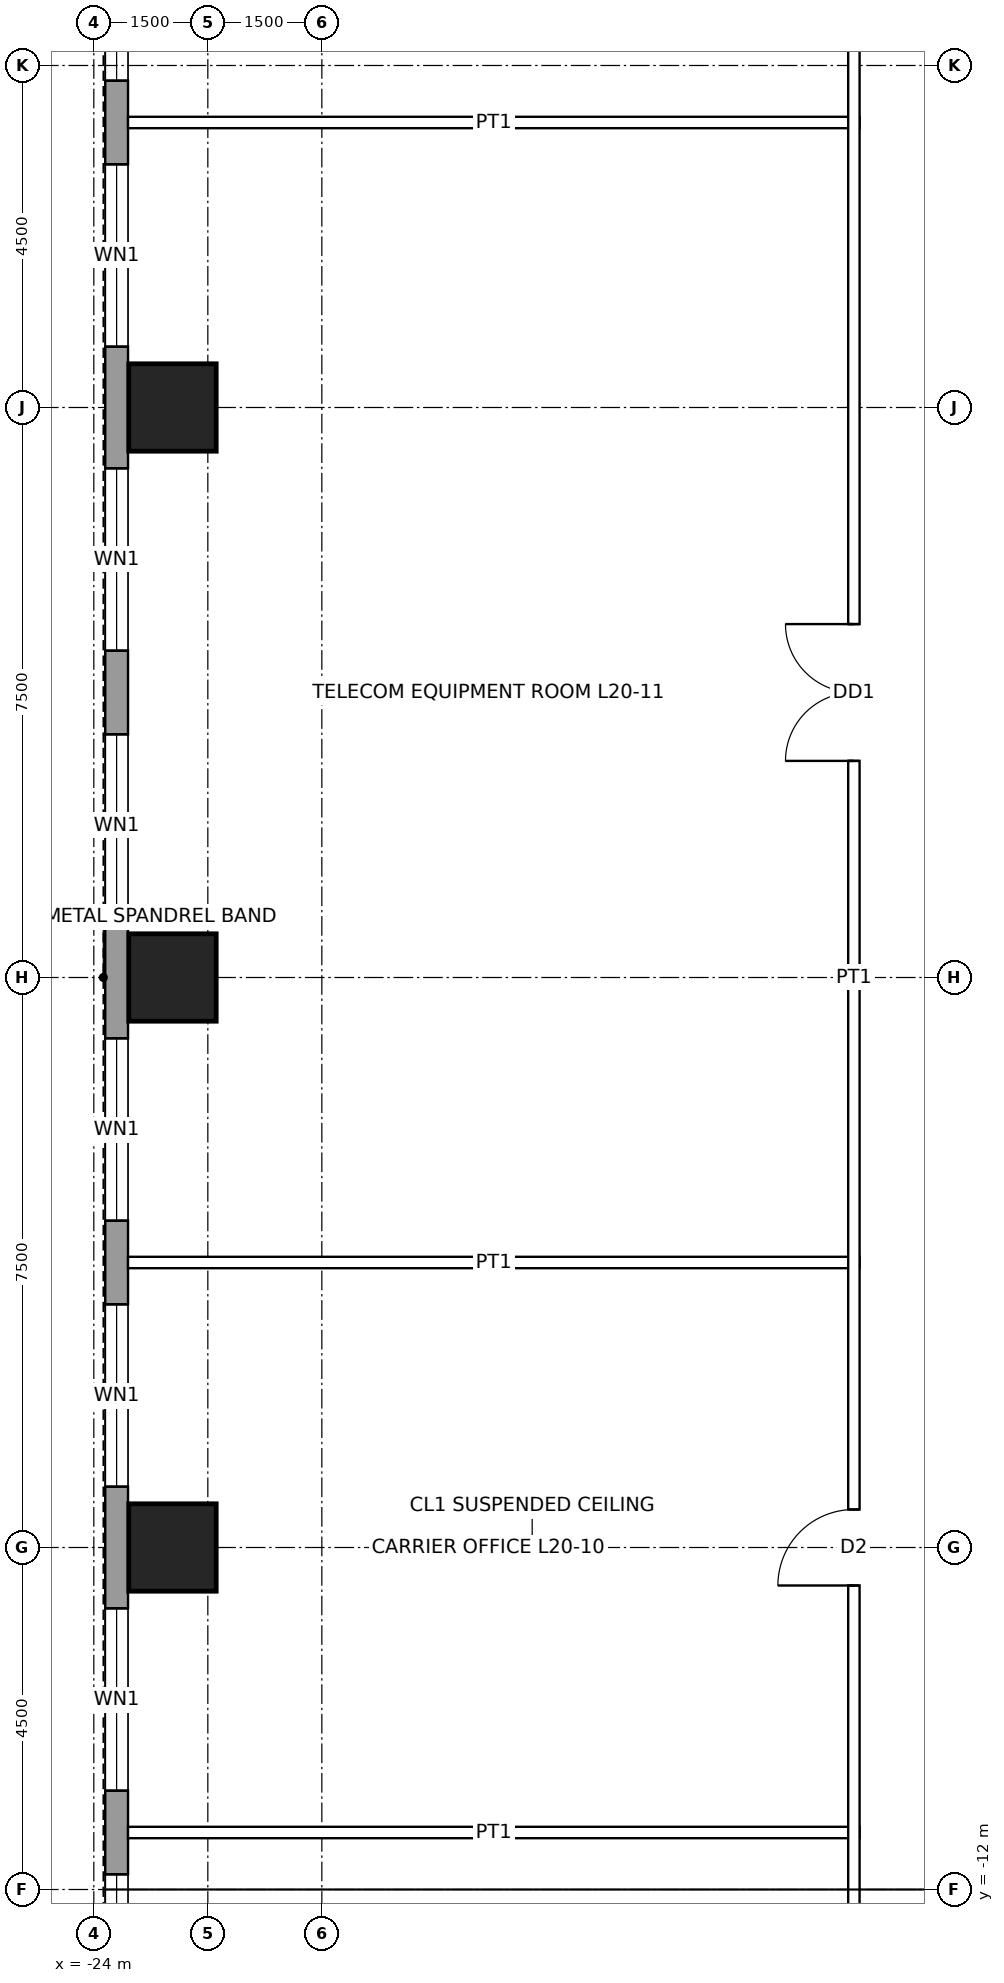
"""IFC4 building model, lengths in metres.
Left out: names, types, materials, properties, quantities, classifications, styles, units other than length and angle.
Written with IfcOpenShell. Run it as: python <this file> out.ifc"""

import sys

from ifc_helpers import new_model, si_unit, direction, frame, frame_2d, origin, origin_2d, place, context, subcontext, project, spatial, rectangle, hollow_rectangle, extrude, element, fill, save


model = new_model("IFC4")
c1 = context("Model", 3, precision=1e-05, world=origin(), true_north=direction((0.0, 1.0)))
c2 = subcontext(c1, "Body", "Model", "MODEL_VIEW")
j1 = project(units=[si_unit("LENGTHUNIT", "METRE"), si_unit("PLANEANGLEUNIT", "RADIAN")], contexts=[c1])
p1 = place(None, origin())
s1 = spatial("IfcSite", under=j1, at=p1, CompositionType="ELEMENT")
p2 = place(p1, origin())
s2 = spatial("IfcBuilding", under=s1, at=p2, CompositionType="ELEMENT")
p3 = place(p2, frame((0.0, 0.0, 104.4)))
s3 = spatial("IfcBuildingStorey", under=s2, at=p3, CompositionType="ELEMENT", Elevation=104.4)
for number, where, z_axis, x_axis in (
    (1, (-22.965, -7.5, 0.0), (0.0, 0.0, 1.0), (1.0, 0.0, 0.0)),
    (2, (-22.965, 0.0, 0.0), (0.0, 0.0, 1.0), (1.0, 0.0, 0.0)),
    (3, (-22.965, 7.5, 0.0), (0.0, 0.0, 1.0), (1.0, 0.0, 0.0)),
):
    element("IfcColumn", number, at=place(p3, frame(where, z_axis=z_axis, x_axis=x_axis)), inside=s3, PredefinedType="COLUMN", context=c2, shape_type="SweptSolid", body=[
        extrude(hollow_rectangle(XDim=1.15, YDim=1.15, WallThickness=0.075, at=origin_2d()), origin(), (0.0, 0.0, 1.0), 4.5),
    ])
p4 = place(p3, frame((-23.7, -16.2, 0.0), z_axis=(0.0, 0.0, 1.0), x_axis=(0.0, 1.0, 0.0)))
e4 = element("IfcWall", 4, at=p4, inside=s3, PredefinedType="SOLIDWALL", context=c2, shape_type="SweptSolid", body=[
    extrude(rectangle(XDim=32.4, YDim=0.3, at=frame_2d((16.2, 0.0))), origin(), (0.0, 0.0, 1.0), 4.3),
])
p5 = place(p4, frame((2.0, 0.0, 1.0)))
e5 = element("IfcOpeningElement", 5, at=p5, cuts=e4, PredefinedType="OPENING", context=c2, shape_type="SweptSolid", body=[
    extrude(rectangle(XDim=2.4, YDim=1.2, at=frame_2d((1.2, 0.6))), frame((0.0, 0.16, 0.0), z_axis=(0.0, -1.0, 0.0), x_axis=(1.0, 0.0, 0.0)), (0.0, 0.0, 1.0), 0.32),
])
p6 = place(p4, frame((5.5, 0.0, 1.0)))
e6 = element("IfcOpeningElement", 6, at=p6, cuts=e4, PredefinedType="OPENING", context=c2, shape_type="SweptSolid", body=[
    extrude(rectangle(XDim=2.4, YDim=1.2, at=frame_2d((1.2, 0.6))), frame((0.0, 0.16, 0.0), z_axis=(0.0, -1.0, 0.0), x_axis=(1.0, 0.0, 0.0)), (0.0, 0.0, 1.0), 0.32),
])
p7 = place(p4, frame((9.5, 0.0, 1.0)))
e7 = element("IfcOpeningElement", 7, at=p7, cuts=e4, PredefinedType="OPENING", context=c2, shape_type="SweptSolid", body=[
    extrude(rectangle(XDim=2.4, YDim=1.2, at=frame_2d((1.2, 0.6))), frame((0.0, 0.16, 0.0), z_axis=(0.0, -1.0, 0.0), x_axis=(1.0, 0.0, 0.0)), (0.0, 0.0, 1.0), 0.32),
])
p8 = place(p4, frame((13.0, 0.0, 1.0)))
e8 = element("IfcOpeningElement", 8, at=p8, cuts=e4, PredefinedType="OPENING", context=c2, shape_type="SweptSolid", body=[
    extrude(rectangle(XDim=2.4, YDim=1.2, at=frame_2d((1.2, 0.6))), frame((0.0, 0.16, 0.0), z_axis=(0.0, -1.0, 0.0), x_axis=(1.0, 0.0, 0.0)), (0.0, 0.0, 1.0), 0.32),
])
p9 = place(p4, frame((17.0, 0.0, 1.0)))
e9 = element("IfcOpeningElement", 9, at=p9, cuts=e4, PredefinedType="OPENING", context=c2, shape_type="SweptSolid", body=[
    extrude(rectangle(XDim=2.4, YDim=1.2, at=frame_2d((1.2, 0.6))), frame((0.0, 0.16, 0.0), z_axis=(0.0, -1.0, 0.0), x_axis=(1.0, 0.0, 0.0)), (0.0, 0.0, 1.0), 0.32),
])
p10 = place(p4, frame((20.5, 0.0, 1.0)))
e10 = element("IfcOpeningElement", 10, at=p10, cuts=e4, PredefinedType="OPENING", context=c2, shape_type="SweptSolid", body=[
    extrude(rectangle(XDim=2.4, YDim=1.2, at=frame_2d((1.2, 0.6))), frame((0.0, 0.16, 0.0), z_axis=(0.0, -1.0, 0.0), x_axis=(1.0, 0.0, 0.0)), (0.0, 0.0, 1.0), 0.32),
])
p11 = place(p4, frame((24.5, 0.0, 1.0)))
e11 = element("IfcOpeningElement", 11, at=p11, cuts=e4, PredefinedType="OPENING", context=c2, shape_type="SweptSolid", body=[
    extrude(rectangle(XDim=2.4, YDim=1.2, at=frame_2d((1.2, 0.6))), frame((0.0, 0.16, 0.0), z_axis=(0.0, -1.0, 0.0), x_axis=(1.0, 0.0, 0.0)), (0.0, 0.0, 1.0), 0.32),
])
p12 = place(p4, frame((28.0, 0.0, 1.0)))
e12 = element("IfcOpeningElement", 12, at=p12, cuts=e4, PredefinedType="OPENING", context=c2, shape_type="SweptSolid", body=[
    extrude(rectangle(XDim=2.4, YDim=1.2, at=frame_2d((1.2, 0.6))), frame((0.0, 0.16, 0.0), z_axis=(0.0, -1.0, 0.0), x_axis=(1.0, 0.0, 0.0)), (0.0, 0.0, 1.0), 0.32),
])
for number, where, z_axis, x_axis in (
    (13, (-23.55, -11.25, 0.0), (0.0, 0.0, 1.0), (1.0, 0.0, 0.0)),
    (14, (-23.55, -3.75, 0.0), (0.0, 0.0, 1.0), (1.0, 0.0, 0.0)),
    (15, (-23.55, 11.25, 0.0), (0.0, 0.0, 1.0), (1.0, 0.0, 0.0)),
):
    element("IfcWall", number, at=place(p3, frame(where, z_axis=z_axis, x_axis=x_axis)), inside=s3, PredefinedType="PARTITIONING", context=c2, shape_type="SweptSolid", body=[
        extrude(rectangle(XDim=9.625, YDim=0.15, at=frame_2d((4.812, 0.0))), origin(), (0.0, 0.0, 1.0), 3.431),
    ])
p13 = place(p3, frame((-14.0, -14.075, 0.0), z_axis=(0.0, 0.0, 1.0), x_axis=(0.0, 1.0, 0.0)))
e16 = element("IfcWall", 16, at=p13, inside=s3, PredefinedType="PARTITIONING", context=c2, shape_type="SweptSolid", body=[
    extrude(rectangle(XDim=28.15, YDim=0.15, at=frame_2d((14.075, 0.0))), origin(), (0.0, 0.0, 1.0), 4.3),
])
p14 = place(p13, frame((6.075, 0.0, 0.0)))
e17 = element("IfcOpeningElement", 17, at=p14, cuts=e16, PredefinedType="OPENING", context=c2, shape_type="SweptSolid", body=[
    extrude(rectangle(XDim=1.0, YDim=2.1, at=frame_2d((0.5, 1.05))), frame((0.0, 0.085, 0.0), z_axis=(0.0, -1.0, 0.0), x_axis=(1.0, 0.0, 0.0)), (0.0, 0.0, 1.0), 0.17),
])
p15 = place(p13, frame((16.925, 0.0, 0.0)))
e18 = element("IfcOpeningElement", 18, at=p15, cuts=e16, PredefinedType="OPENING", context=c2, shape_type="SweptSolid", body=[
    extrude(rectangle(XDim=1.8, YDim=2.4, at=frame_2d((0.9, 1.2))), frame((0.0, 0.085, 0.0), z_axis=(0.0, -1.0, 0.0), x_axis=(1.0, 0.0, 0.0)), (0.0, 0.0, 1.0), 0.17),
])
p16 = place(p5, origin())
e19 = element("IfcWindow", 19, at=p16, inside=s3, PartitioningType="SINGLE_PANEL", PredefinedType="WINDOW", context=c2, shape_type="SweptSolid", body=[
    extrude(rectangle(XDim=2.4, YDim=1.2, at=frame_2d((1.2, 0.6))), frame((0.0, 0.03, 0.0), z_axis=(0.0, -1.0, 0.0), x_axis=(1.0, 0.0, 0.0)), (0.0, 0.0, 1.0), 0.06),
])
fill(e5, e19)
p17 = place(p6, origin())
e20 = element("IfcWindow", 20, at=p17, inside=s3, PartitioningType="SINGLE_PANEL", PredefinedType="WINDOW", context=c2, shape_type="SweptSolid", body=[
    extrude(rectangle(XDim=2.4, YDim=1.2, at=frame_2d((1.2, 0.6))), frame((0.0, 0.03, 0.0), z_axis=(0.0, -1.0, 0.0), x_axis=(1.0, 0.0, 0.0)), (0.0, 0.0, 1.0), 0.06),
])
fill(e6, e20)
p18 = place(p7, origin())
e21 = element("IfcWindow", 21, at=p18, inside=s3, PartitioningType="SINGLE_PANEL", PredefinedType="WINDOW", context=c2, shape_type="SweptSolid", body=[
    extrude(rectangle(XDim=2.4, YDim=1.2, at=frame_2d((1.2, 0.6))), frame((0.0, 0.03, 0.0), z_axis=(0.0, -1.0, 0.0), x_axis=(1.0, 0.0, 0.0)), (0.0, 0.0, 1.0), 0.06),
])
fill(e7, e21)
p19 = place(p8, origin())
e22 = element("IfcWindow", 22, at=p19, inside=s3, PartitioningType="SINGLE_PANEL", PredefinedType="WINDOW", context=c2, shape_type="SweptSolid", body=[
    extrude(rectangle(XDim=2.4, YDim=1.2, at=frame_2d((1.2, 0.6))), frame((0.0, 0.03, 0.0), z_axis=(0.0, -1.0, 0.0), x_axis=(1.0, 0.0, 0.0)), (0.0, 0.0, 1.0), 0.06),
])
fill(e8, e22)
p20 = place(p9, origin())
e23 = element("IfcWindow", 23, at=p20, inside=s3, PartitioningType="SINGLE_PANEL", PredefinedType="WINDOW", context=c2, shape_type="SweptSolid", body=[
    extrude(rectangle(XDim=2.4, YDim=1.2, at=frame_2d((1.2, 0.6))), frame((0.0, 0.03, 0.0), z_axis=(0.0, -1.0, 0.0), x_axis=(1.0, 0.0, 0.0)), (0.0, 0.0, 1.0), 0.06),
])
fill(e9, e23)
p21 = place(p10, origin())
e24 = element("IfcWindow", 24, at=p21, inside=s3, PartitioningType="SINGLE_PANEL", PredefinedType="WINDOW", context=c2, shape_type="SweptSolid", body=[
    extrude(rectangle(XDim=2.4, YDim=1.2, at=frame_2d((1.2, 0.6))), frame((0.0, 0.03, 0.0), z_axis=(0.0, -1.0, 0.0), x_axis=(1.0, 0.0, 0.0)), (0.0, 0.0, 1.0), 0.06),
])
fill(e10, e24)
p22 = place(p11, origin())
e25 = element("IfcWindow", 25, at=p22, inside=s3, PartitioningType="SINGLE_PANEL", PredefinedType="WINDOW", context=c2, shape_type="SweptSolid", body=[
    extrude(rectangle(XDim=2.4, YDim=1.2, at=frame_2d((1.2, 0.6))), frame((0.0, 0.03, 0.0), z_axis=(0.0, -1.0, 0.0), x_axis=(1.0, 0.0, 0.0)), (0.0, 0.0, 1.0), 0.06),
])
fill(e11, e25)
p23 = place(p12, origin())
e26 = element("IfcWindow", 26, at=p23, inside=s3, PartitioningType="SINGLE_PANEL", PredefinedType="WINDOW", context=c2, shape_type="SweptSolid", body=[
    extrude(rectangle(XDim=2.4, YDim=1.2, at=frame_2d((1.2, 0.6))), frame((0.0, 0.03, 0.0), z_axis=(0.0, -1.0, 0.0), x_axis=(1.0, 0.0, 0.0)), (0.0, 0.0, 1.0), 0.06),
])
fill(e12, e26)
p24 = place(p14, origin())
e27 = element("IfcDoor", 27, at=p24, inside=s3, OperationType="SINGLE_SWING_LEFT", PredefinedType="DOOR", context=c2, shape_type="SweptSolid", body=[
    extrude(rectangle(XDim=1.0, YDim=2.1, at=frame_2d((0.5, 1.05))), frame((0.0, 0.025, 0.0), z_axis=(0.0, -1.0, 0.0), x_axis=(1.0, 0.0, 0.0)), (0.0, 0.0, 1.0), 0.05),
])
fill(e17, e27)
p25 = place(p15, origin())
e28 = element("IfcDoor", 28, at=p25, inside=s3, OperationType="DOUBLE_DOOR_SINGLE_SWING", PredefinedType="DOOR", context=c2, shape_type="SweptSolid", body=[
    extrude(rectangle(XDim=1.8, YDim=2.4, at=frame_2d((0.9, 1.2))), frame((0.0, 0.025, 0.0), z_axis=(0.0, -1.0, 0.0), x_axis=(1.0, 0.0, 0.0)), (0.0, 0.0, 1.0), 0.05),
])
fill(e18, e28)
save(model, sys.argv[1])
